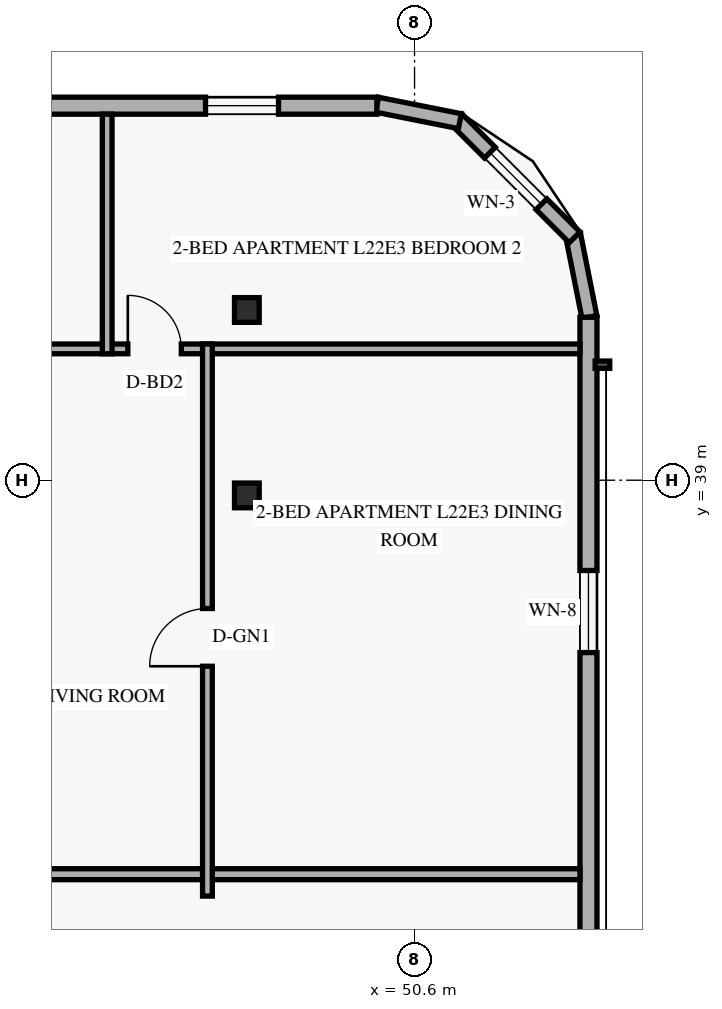
"""IFC4 building model, lengths in metres.
Left out: names, types, materials, properties, quantities, classifications, styles, units other than length and angle.
Written with IfcOpenShell. Run it as: python <this file> out.ifc"""

import sys

from ifc_helpers import new_model, si_unit, direction, frame, frame_2d, origin, origin_2d, place, context, subcontext, project, spatial, rectangle, hollow_rectangle, extrude, element, fill, save


model = new_model("IFC4")
c1 = context("Model", 3, precision=1e-05, world=origin(), true_north=direction((0.0, 1.0)))
c2 = subcontext(c1, "Body", "Model", "MODEL_VIEW")
j1 = project(units=[si_unit("LENGTHUNIT", "METRE"), si_unit("PLANEANGLEUNIT", "RADIAN")], contexts=[c1])
p1 = place(None, origin())
s1 = spatial("IfcSite", under=j1, at=p1, CompositionType="ELEMENT")
p2 = place(p1, origin())
s2 = spatial("IfcBuilding", under=s1, at=p2, CompositionType="ELEMENT")
p3 = place(p2, frame((0.0, 0.0, 87.6)))
s3 = spatial("IfcBuildingStorey", under=s2, at=p3, CompositionType="ELEMENT", Elevation=87.6)
for number, where, z_axis, x_axis in (
    (1, (47.738, 38.75, 0.0), (0.058, 0.0, 0.998), (0.0, 1.0, 0.0)),
    (2, (47.738, 41.8, 0.0), (0.058, 0.0, 0.998), (0.0, 1.0, 0.0)),
):
    element("IfcColumn", number, at=place(p3, frame(where, z_axis=z_axis, x_axis=x_axis)), inside=s3, PredefinedType="COLUMN", context=c2, shape_type="SweptSolid", body=[
        extrude(hollow_rectangle(XDim=0.406, YDim=0.406, WallThickness=0.016, at=origin_2d()), origin(), (0.0, 0.0, 1.0), 3.606),
    ])
p4 = place(p3, frame((53.476, 41.684, 0.0), z_axis=(0.0, 0.0, 1.0), x_axis=(-0.195000137217, 0.980803214965, 0.0)))
e3 = element("IfcWall", 3, at=p4, inside=s3, PredefinedType="SOLIDWALL", context=c2, shape_type="SweptSolid", body=[
    extrude(rectangle(XDim=1.388, YDim=0.25, at=frame_2d((0.694, 0.0))), origin(), (0.0, 0.0, 1.0), 3.36),
])
p5 = place(p3, frame((53.232, 42.995, 0.0), z_axis=(0.0, 0.0, 1.0), x_axis=(-0.707151344399, 0.707062215165, 0.0)))
e4 = element("IfcWall", 4, at=p5, inside=s3, PredefinedType="SOLIDWALL", context=c2, shape_type="SweptSolid", body=[
    extrude(rectangle(XDim=2.739, YDim=0.25, at=frame_2d((1.37, 0.0))), origin(), (0.0, 0.0, 1.0), 3.36),
])
p6 = place(p5, frame((0.77, 0.0, 0.85)))
e5 = element("IfcOpeningElement", 5, at=p6, cuts=e4, PredefinedType="OPENING", context=c2, shape_type="SweptSolid", body=[
    extrude(rectangle(XDim=1.2, YDim=1.5, at=frame_2d((0.6, 0.75))), frame((0.0, 0.135, 0.0), z_axis=(0.0, -1.0, 0.0), x_axis=(1.0, 0.0, 0.0)), (0.0, 0.0, 1.0), 0.27),
])
p7 = place(p3, frame((51.345, 44.905, 0.0), z_axis=(0.0, 0.0, 1.0), x_axis=(-0.980809899341, 0.19496651342, 0.0)))
e6 = element("IfcWall", 6, at=p7, inside=s3, PredefinedType="SOLIDWALL", context=c2, shape_type="SweptSolid", body=[
    extrude(rectangle(XDim=1.389, YDim=0.25, at=frame_2d((0.694, 0.0))), origin(), (0.0, 0.0, 1.0), 3.36),
])
p8 = place(p3, frame((53.46, 6.32, 0.0), z_axis=(0.0, 0.0, 1.0), x_axis=(0.0, 1.0, 0.0)))
e7 = element("IfcWall", 7, at=p8, inside=s3, PredefinedType="SOLIDWALL", context=c2, shape_type="SweptSolid", body=[
    extrude(rectangle(XDim=35.36, YDim=0.28, at=frame_2d((17.68, 0.0))), origin(), (0.0, 0.0, 1.0), 3.36),
])
p9 = place(p8, frame((4.97, 0.0, 0.85)))
e8 = element("IfcOpeningElement", 8, at=p9, cuts=e7, PredefinedType="OPENING", context=c2, shape_type="SweptSolid", body=[
    extrude(rectangle(XDim=1.35, YDim=1.55, at=frame_2d((0.675, 0.775))), frame((0.0, 0.15, 0.0), z_axis=(0.0, -1.0, 0.0), x_axis=(1.0, 0.0, 0.0)), (0.0, 0.0, 1.0), 0.3),
])
p10 = place(p8, frame((15.825, 0.0, 0.85)))
e9 = element("IfcOpeningElement", 9, at=p10, cuts=e7, PredefinedType="OPENING", context=c2, shape_type="SweptSolid", body=[
    extrude(rectangle(XDim=1.35, YDim=1.55, at=frame_2d((0.675, 0.775))), frame((0.0, 0.15, 0.0), z_axis=(0.0, -1.0, 0.0), x_axis=(1.0, 0.0, 0.0)), (0.0, 0.0, 1.0), 0.3),
])
p11 = place(p8, frame((23.28, 0.0, 0.85)))
e10 = element("IfcOpeningElement", 10, at=p11, cuts=e7, PredefinedType="OPENING", context=c2, shape_type="SweptSolid", body=[
    extrude(rectangle(XDim=1.35, YDim=1.55, at=frame_2d((0.675, 0.775))), frame((0.0, 0.15, 0.0), z_axis=(0.0, -1.0, 0.0), x_axis=(1.0, 0.0, 0.0)), (0.0, 0.0, 1.0), 0.3),
])
p12 = place(p8, frame((29.845, 0.0, 0.85)))
e11 = element("IfcOpeningElement", 11, at=p12, cuts=e7, PredefinedType="OPENING", context=c2, shape_type="SweptSolid", body=[
    extrude(rectangle(XDim=1.35, YDim=1.55, at=frame_2d((0.675, 0.775))), frame((0.0, 0.15, 0.0), z_axis=(0.0, -1.0, 0.0), x_axis=(1.0, 0.0, 0.0)), (0.0, 0.0, 1.0), 0.3),
])
p13 = place(p3, frame((49.98, 45.16, 0.0), z_axis=(0.0, 0.0, 1.0), x_axis=(-1.0, 0.0, 0.0)))
e12 = element("IfcWall", 12, at=p13, inside=s3, PredefinedType="SOLIDWALL", context=c2, shape_type="SweptSolid", body=[
    extrude(rectangle(XDim=36.56, YDim=0.28, at=frame_2d((18.28, 0.0))), origin(), (0.0, 0.0, 1.0), 3.36),
])
p14 = place(p13, frame((31.215, 0.0, 0.85)))
e13 = element("IfcOpeningElement", 13, at=p14, cuts=e12, PredefinedType="OPENING", context=c2, shape_type="SweptSolid", body=[
    extrude(rectangle(XDim=1.2, YDim=1.5, at=frame_2d((0.6, 0.75))), frame((0.0, 0.15, 0.0), z_axis=(0.0, -1.0, 0.0), x_axis=(1.0, 0.0, 0.0)), (0.0, 0.0, 1.0), 0.3),
])
p15 = place(p13, frame((26.68, 0.0, 0.85)))
e14 = element("IfcOpeningElement", 14, at=p15, cuts=e12, PredefinedType="OPENING", context=c2, shape_type="SweptSolid", body=[
    extrude(rectangle(XDim=1.2, YDim=1.5, at=frame_2d((0.6, 0.75))), frame((0.0, 0.15, 0.0), z_axis=(0.0, -1.0, 0.0), x_axis=(1.0, 0.0, 0.0)), (0.0, 0.0, 1.0), 0.3),
])
p16 = place(p13, frame((22.829, 0.0, 0.85)))
e15 = element("IfcOpeningElement", 15, at=p16, cuts=e12, PredefinedType="OPENING", context=c2, shape_type="SweptSolid", body=[
    extrude(rectangle(XDim=1.2, YDim=1.5, at=frame_2d((0.6, 0.75))), frame((0.0, 0.15, 0.0), z_axis=(0.0, -1.0, 0.0), x_axis=(1.0, 0.0, 0.0)), (0.0, 0.0, 1.0), 0.3),
])
p17 = place(p13, frame((16.994, 0.0, 0.85)))
e16 = element("IfcOpeningElement", 16, at=p17, cuts=e12, PredefinedType="OPENING", context=c2, shape_type="SweptSolid", body=[
    extrude(rectangle(XDim=1.2, YDim=1.5, at=frame_2d((0.6, 0.75))), frame((0.0, 0.15, 0.0), z_axis=(0.0, -1.0, 0.0), x_axis=(1.0, 0.0, 0.0)), (0.0, 0.0, 1.0), 0.3),
])
p18 = place(p13, frame((12.895, 0.0, 0.85)))
e17 = element("IfcOpeningElement", 17, at=p18, cuts=e12, PredefinedType="OPENING", context=c2, shape_type="SweptSolid", body=[
    extrude(rectangle(XDim=1.2, YDim=1.5, at=frame_2d((0.6, 0.75))), frame((0.0, 0.15, 0.0), z_axis=(0.0, -1.0, 0.0), x_axis=(1.0, 0.0, 0.0)), (0.0, 0.0, 1.0), 0.3),
])
p19 = place(p13, frame((7.833, 0.0, 0.85)))
e18 = element("IfcOpeningElement", 18, at=p19, cuts=e12, PredefinedType="OPENING", context=c2, shape_type="SweptSolid", body=[
    extrude(rectangle(XDim=1.2, YDim=1.5, at=frame_2d((0.6, 0.75))), frame((0.0, 0.15, 0.0), z_axis=(0.0, -1.0, 0.0), x_axis=(1.0, 0.0, 0.0)), (0.0, 0.0, 1.0), 0.3),
])
p20 = place(p13, frame((1.617, 0.0, 0.85)))
e19 = element("IfcOpeningElement", 19, at=p20, cuts=e12, PredefinedType="OPENING", context=c2, shape_type="SweptSolid", body=[
    extrude(rectangle(XDim=1.2, YDim=1.5, at=frame_2d((0.6, 0.75))), frame((0.0, 0.15, 0.0), z_axis=(0.0, -1.0, 0.0), x_axis=(1.0, 0.0, 0.0)), (0.0, 0.0, 1.0), 0.3),
])
p21 = place(p3, frame((37.64, 32.52, 0.0), z_axis=(0.0, 0.0, 1.0), x_axis=(1.0, 0.0, 0.0)))
e20 = element("IfcWall", 20, at=p21, inside=s3, PredefinedType="PARTITIONING", context=c2, shape_type="SweptSolid", body=[
    extrude(rectangle(XDim=15.68, YDim=0.18, at=frame_2d((7.84, 0.0))), origin(), (0.0, 0.0, 1.0), 2.731),
])
p22 = place(p3, frame((37.64, 41.16, 0.0), z_axis=(0.0, 0.0, 1.0), x_axis=(1.0, 0.0, 0.0)))
e21 = element("IfcWall", 21, at=p22, inside=s3, PredefinedType="PARTITIONING", context=c2, shape_type="SweptSolid", body=[
    extrude(rectangle(XDim=15.68, YDim=0.16, at=frame_2d((7.84, 0.0))), origin(), (0.0, 0.0, 1.0), 2.731),
])
p23 = place(p22, frame((3.931, 0.0, 0.0)))
e22 = element("IfcOpeningElement", 22, at=p23, cuts=e21, PredefinedType="OPENING", context=c2, shape_type="SweptSolid", body=[
    extrude(rectangle(XDim=0.88, YDim=2.14, at=frame_2d((0.44, 1.07))), frame((0.0, 0.09, 0.0), z_axis=(0.0, -1.0, 0.0), x_axis=(1.0, 0.0, 0.0)), (0.0, 0.0, 1.0), 0.18),
])
p24 = place(p22, frame((8.244, 0.0, 0.0)))
e23 = element("IfcOpeningElement", 23, at=p24, cuts=e21, PredefinedType="OPENING", context=c2, shape_type="SweptSolid", body=[
    extrude(rectangle(XDim=0.88, YDim=2.14, at=frame_2d((0.44, 1.07))), frame((0.0, 0.09, 0.0), z_axis=(0.0, -1.0, 0.0), x_axis=(1.0, 0.0, 0.0)), (0.0, 0.0, 1.0), 0.18),
])
p25 = place(p3, frame((47.194, 32.16, 0.0), z_axis=(0.0, 0.0, 1.0), x_axis=(0.0, 1.0, 0.0)))
e24 = element("IfcWall", 24, at=p25, inside=s3, PredefinedType="PARTITIONING", context=c2, shape_type="SweptSolid", body=[
    extrude(rectangle(XDim=9.08, YDim=0.16, at=frame_2d((4.54, 0.0))), origin(), (0.0, 0.0, 1.0), 2.731),
])
p26 = place(p25, frame((3.78, 0.0, 0.0)))
e25 = element("IfcOpeningElement", 25, at=p26, cuts=e24, PredefinedType="OPENING", context=c2, shape_type="SweptSolid", body=[
    extrude(rectangle(XDim=0.95, YDim=2.15, at=frame_2d((0.475, 1.075))), frame((0.0, 0.09, 0.0), z_axis=(0.0, -1.0, 0.0), x_axis=(1.0, 0.0, 0.0)), (0.0, 0.0, 1.0), 0.18),
])
p27 = place(p3, frame((45.545, 41.08, 0.0), z_axis=(0.0, 0.0, 1.0), x_axis=(0.0, 1.0, 0.0)))
e26 = element("IfcWall", 26, at=p27, inside=s3, PredefinedType="PARTITIONING", context=c2, shape_type="SweptSolid", body=[
    extrude(rectangle(XDim=3.94, YDim=0.16, at=frame_2d((1.97, 0.0))), origin(), (0.0, 0.0, 1.0), 2.809),
])
p28 = place(p6, origin())
e27 = element("IfcWindow", 27, at=p28, inside=s3, PartitioningType="SINGLE_PANEL", PredefinedType="WINDOW", context=c2, shape_type="SweptSolid", body=[
    extrude(rectangle(XDim=1.2, YDim=1.5, at=frame_2d((0.6, 0.75))), frame((0.0, 0.03, 0.0), z_axis=(0.0, -1.0, 0.0), x_axis=(1.0, 0.0, 0.0)), (0.0, 0.0, 1.0), 0.06),
])
fill(e5, e27)
p29 = place(p12, origin())
e28 = element("IfcWindow", 28, at=p29, inside=s3, PartitioningType="SINGLE_PANEL", PredefinedType="WINDOW", context=c2, shape_type="SweptSolid", body=[
    extrude(rectangle(XDim=1.35, YDim=1.55, at=frame_2d((0.675, 0.775))), frame((0.0, 0.03, 0.0), z_axis=(0.0, -1.0, 0.0), x_axis=(1.0, 0.0, 0.0)), (0.0, 0.0, 1.0), 0.06),
])
fill(e11, e28)
p30 = place(p20, origin())
e29 = element("IfcWindow", 29, at=p30, inside=s3, PartitioningType="SINGLE_PANEL", PredefinedType="WINDOW", context=c2, shape_type="SweptSolid", body=[
    extrude(rectangle(XDim=1.2, YDim=1.5, at=frame_2d((0.6, 0.75))), frame((0.0, 0.03, 0.0), z_axis=(0.0, -1.0, 0.0), x_axis=(1.0, 0.0, 0.0)), (0.0, 0.0, 1.0), 0.06),
])
fill(e19, e29)
p31 = place(p26, origin())
e30 = element("IfcDoor", 30, at=p31, inside=s3, OperationType="SINGLE_SWING_LEFT", PredefinedType="DOOR", context=c2, shape_type="SweptSolid", body=[
    extrude(rectangle(XDim=0.95, YDim=2.15, at=frame_2d((0.475, 1.075))), frame((0.0, 0.025, 0.0), z_axis=(0.0, -1.0, 0.0), x_axis=(1.0, 0.0, 0.0)), (0.0, 0.0, 1.0), 0.05),
])
fill(e25, e30)
p32 = place(p24, origin())
e31 = element("IfcDoor", 31, at=p32, inside=s3, OperationType="SINGLE_SWING_LEFT", PredefinedType="DOOR", context=c2, shape_type="SweptSolid", body=[
    extrude(rectangle(XDim=0.88, YDim=2.14, at=frame_2d((0.44, 1.07))), frame((0.0, 0.025, 0.0), z_axis=(0.0, -1.0, 0.0), x_axis=(1.0, 0.0, 0.0)), (0.0, 0.0, 1.0), 0.05),
])
fill(e23, e31)
save(model, sys.argv[1])
